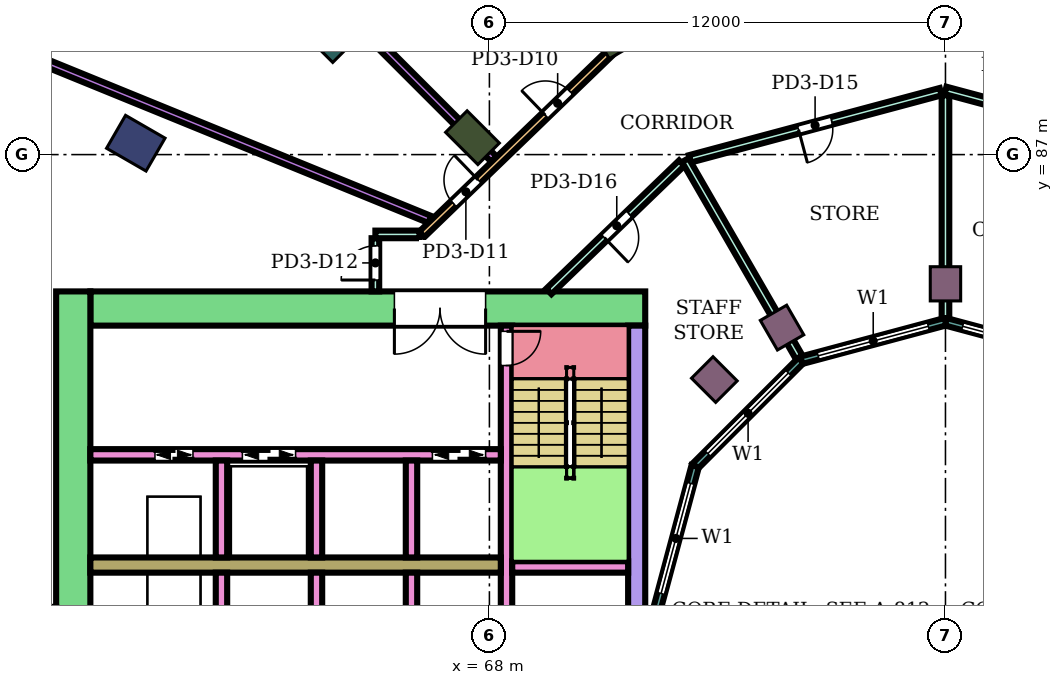
"""IFC4 building model, lengths in metres.
Left out: names, types, materials, properties, quantities, classifications, styles, units other than length and angle.
Written with IfcOpenShell. Run it as: python <this file> out.ifc"""

import sys

from ifc_helpers import new_model, si_unit, direction, frame, frame_2d, origin, origin_2d, place, context, subcontext, project, spatial, rectangle, extrude, element, fill, save


model = new_model("IFC4")
c1 = context("Model", 3, precision=1e-05, world=origin(), true_north=direction((0.0, 1.0)))
c2 = subcontext(c1, "Body", "Model", "MODEL_VIEW")
j1 = project(units=[si_unit("LENGTHUNIT", "METRE"), si_unit("PLANEANGLEUNIT", "RADIAN")], contexts=[c1])
p1 = place(None, origin())
s1 = spatial("IfcSite", under=j1, at=p1, CompositionType="ELEMENT")
p2 = place(p1, origin())
s2 = spatial("IfcBuilding", under=s1, at=p2, CompositionType="ELEMENT")
p3 = place(p2, frame((0.0, 0.0, 17.8)))
s3 = spatial("IfcBuildingStorey", under=s2, at=p3, CompositionType="ELEMENT", Elevation=17.8)
p4 = place(p3, frame((58.696, 87.3, 0.0), z_axis=(0.0, 0.0, 1.0), x_axis=(-0.866025403784, 0.5, 0.0)))
e1 = element("IfcColumn", 1, at=p4, inside=s3, PredefinedType="COLUMN", context=c2, shape_type="SweptSolid", body=[
    extrude(rectangle(XDim=1.2, YDim=1.0, at=origin_2d()), origin(), (0.0, 0.0, 1.0), 6.0),
])
for number, where, z_axis, x_axis in (
    (2, (71.2, 90.242, 0.0), (0.0, 0.0, 1.0), (-0.5, 0.866, 0.0)),
    (3, (67.555, 87.445, 0.0), (0.0, 0.0, 1.0), (-0.707, 0.707, 0.0)),
):
    element("IfcColumn", number, at=place(p3, frame(where, z_axis=z_axis, x_axis=x_axis)), inside=s3, PredefinedType="COLUMN", context=c2, shape_type="SweptSolid", body=[
        extrude(rectangle(XDim=1.2, YDim=0.8, at=origin_2d()), origin(), (0.0, 0.0, 1.0), 6.0),
    ])
for number, where, z_axis, x_axis in (
    (4, (80.0, 83.6, 0.0), (0.0, 0.0, 1.0), (0.0, 1.0, 0.0)),
    (5, (75.7, 82.448, 0.0), (0.0, 0.0, 1.0), (-0.5, 0.866, 0.0)),
    (6, (73.919, 81.081, 0.0), (0.0, 0.0, 1.0), (-0.707, 0.707, 0.0)),
):
    element("IfcColumn", number, at=place(p3, frame(where, z_axis=z_axis, x_axis=x_axis)), inside=s3, PredefinedType="COLUMN", context=c2, shape_type="SweptSolid", body=[
        extrude(rectangle(XDim=0.9, YDim=0.8, at=origin_2d()), origin(), (0.0, 0.0, 1.0), 6.0),
    ])
p5 = place(p3, frame((64.09, 90.91, 0.0), z_axis=(0.0, 0.0, 1.0), x_axis=(-0.707106781187, 0.707106781187, 0.0)))
e7 = element("IfcColumn", 7, at=p5, inside=s3, PredefinedType="COLUMN", context=c2, shape_type="SweptSolid", body=[
    extrude(rectangle(XDim=1.8, YDim=2.4, at=origin_2d()), origin(), (0.0, 0.0, 1.0), 6.0),
])
p6 = place(p3, frame((72.1, 82.95, 0.0), z_axis=(0.0, 0.0, 1.0), x_axis=(-1.0, 0.0, 0.0)))
e8 = element("IfcWall", 8, at=p6, inside=s3, PredefinedType="SHEAR", context=c2, shape_type="SweptSolid", body=[
    extrude(rectangle(XDim=14.6, YDim=0.9, at=frame_2d((7.3, 0.0))), origin(), (0.0, 0.0, 1.0), 5.55),
])
p7 = place(p6, frame((4.2, 0.0, 0.0)))
e9 = element("IfcOpeningElement", 9, at=p7, cuts=e8, PredefinedType="OPENING", context=c2, shape_type="SweptSolid", body=[
    extrude(rectangle(XDim=2.4, YDim=2.4, at=frame_2d((1.2, 1.2))), frame((0.0, 0.46, 0.0), z_axis=(0.0, -1.0, 0.0), x_axis=(1.0, 0.0, 0.0)), (0.0, 0.0, 1.0), 0.92),
])
p8 = place(p3, frame((71.875, 82.5, 0.0), z_axis=(0.0, 0.0, 1.0), x_axis=(0.0, -1.0, 0.0)))
e10 = element("IfcWall", 10, at=p8, inside=s3, PredefinedType="SHEAR", context=c2, shape_type="SweptSolid", body=[
    extrude(rectangle(XDim=7.5, YDim=0.45, at=frame_2d((3.75, 0.0))), origin(), (0.0, 0.0, 1.0), 5.55),
])
p9 = place(p3, frame((57.05, 83.4, 0.0), z_axis=(0.0, 0.0, 1.0), x_axis=(0.0, -1.0, 0.0)))
e11 = element("IfcWall", 11, at=p9, inside=s3, PredefinedType="SHEAR", context=c2, shape_type="SweptSolid", body=[
    extrude(rectangle(XDim=16.8, YDim=0.9, at=frame_2d((8.4, 0.0))), origin(), (0.0, 0.0, 1.0), 5.55),
])
p10 = place(p3, frame((68.45, 82.5, 0.0), z_axis=(0.0, 0.0, 1.0), x_axis=(0.0, -1.0, 0.0)))
e12 = element("IfcWall", 12, at=p10, inside=s3, PredefinedType="SHEAR", context=c2, shape_type="SweptSolid", body=[
    extrude(rectangle(XDim=7.5, YDim=0.3, at=frame_2d((3.75, 0.0))), origin(), (0.0, 0.0, 1.0), 5.55),
])
p11 = place(p10, frame((0.15, 0.0, 0.0)))
e13 = element("IfcOpeningElement", 13, at=p11, cuts=e12, PredefinedType="OPENING", context=c2, shape_type="SweptSolid", body=[
    extrude(rectangle(XDim=0.9, YDim=2.1, at=frame_2d((0.45, 1.05))), frame((0.0, 0.16, 0.0), z_axis=(0.0, -1.0, 0.0), x_axis=(1.0, 0.0, 0.0)), (0.0, 0.0, 1.0), 0.32),
])
p12 = place(p3, frame((71.65, 76.15, 0.0), z_axis=(0.0, 0.0, 1.0), x_axis=(-1.0, 0.0, 0.0)))
e14 = element("IfcWall", 14, at=p12, inside=s3, PredefinedType="SHEAR", context=c2, shape_type="SweptSolid", body=[
    extrude(rectangle(XDim=3.05, YDim=0.3, at=frame_2d((1.525, 0.0))), origin(), (0.0, 0.0, 1.0), 5.55),
])
p13 = place(p3, frame((68.3, 76.2, 0.0), z_axis=(0.0, 0.0, 1.0), x_axis=(-1.0, 0.0, 0.0)))
e15 = element("IfcWall", 15, at=p13, inside=s3, PredefinedType="SHEAR", context=c2, shape_type="SweptSolid", body=[
    extrude(rectangle(XDim=10.8, YDim=0.4, at=frame_2d((5.4, 0.0))), origin(), (0.0, 0.0, 1.0), 5.55),
])
p14 = place(p3, frame((68.3, 79.1, 0.0), z_axis=(0.0, 0.0, 1.0), x_axis=(-1.0, 0.0, 0.0)))
e16 = element("IfcWall", 16, at=p14, inside=s3, PredefinedType="SHEAR", context=c2, shape_type="SweptSolid", body=[
    extrude(rectangle(XDim=10.8, YDim=0.3, at=frame_2d((5.4, 0.0))), origin(), (0.0, 0.0, 1.0), 5.55),
])
p15 = place(p14, frame((0.4, 0.0, 0.0)))
e17 = element("IfcOpeningElement", 17, at=p15, cuts=e16, PredefinedType="OPENING", context=c2, shape_type="SweptSolid", body=[
    extrude(rectangle(XDim=1.4, YDim=2.1, at=frame_2d((0.7, 1.05))), frame((0.0, 0.16, 0.0), z_axis=(0.0, -1.0, 0.0), x_axis=(1.0, 0.0, 0.0)), (0.0, 0.0, 1.0), 0.32),
])
p16 = place(p14, frame((5.4, 0.0, 0.0)))
e18 = element("IfcOpeningElement", 18, at=p16, cuts=e16, PredefinedType="OPENING", context=c2, shape_type="SweptSolid", body=[
    extrude(rectangle(XDim=1.4, YDim=2.1, at=frame_2d((0.7, 1.05))), frame((0.0, 0.16, 0.0), z_axis=(0.0, -1.0, 0.0), x_axis=(1.0, 0.0, 0.0)), (0.0, 0.0, 1.0), 0.32),
])
p17 = place(p14, frame((8.1, 0.0, 0.0)))
e19 = element("IfcOpeningElement", 19, at=p17, cuts=e16, PredefinedType="OPENING", context=c2, shape_type="SweptSolid", body=[
    extrude(rectangle(XDim=1.0, YDim=2.1, at=frame_2d((0.5, 1.05))), frame((0.0, 0.16, 0.0), z_axis=(0.0, -1.0, 0.0), x_axis=(1.0, 0.0, 0.0)), (0.0, 0.0, 1.0), 0.32),
])
for number, where, z_axis, x_axis in (
    (20, (65.95, 76.0, 0.0), (0.0, 0.0, 1.0), (0.0, -1.0, 0.0)),
    (21, (63.45, 76.0, 0.0), (0.0, 0.0, 1.0), (0.0, -1.0, 0.0)),
    (22, (60.95, 76.0, 0.0), (0.0, 0.0, 1.0), (0.0, -1.0, 0.0)),
    (23, (65.95, 78.95, 0.0), (0.0, 0.0, 1.0), (0.0, -1.0, 0.0)),
    (24, (63.45, 78.95, 0.0), (0.0, 0.0, 1.0), (0.0, -1.0, 0.0)),
    (25, (60.95, 78.95, 0.0), (0.0, 0.0, 1.0), (0.0, -1.0, 0.0)),
):
    element("IfcWall", number, at=place(p3, frame(where, z_axis=z_axis, x_axis=x_axis)), inside=s3, PredefinedType="SHEAR", context=c2, shape_type="SweptSolid", body=[
        extrude(rectangle(XDim=2.55, YDim=0.3, at=frame_2d((1.275, 0.0))), origin(), (0.0, 0.0, 1.0), 5.55),
    ])
p18 = place(p3, frame((83.802, 81.585, 0.0), z_axis=(0.0, 0.0, 1.0), x_axis=(-0.965933654434, 0.258789828301, 0.0)))
e26 = element("IfcWall", 26, at=p18, inside=s3, PredefinedType="NOTDEFINED", context=c2, shape_type="SweptSolid", body=[
    extrude(rectangle(XDim=3.936, YDim=0.2, at=frame_2d((1.968, 0.0))), origin(), (0.0, 0.0, 1.0), 6.0),
])
p19 = place(p18, frame((0.468, 0.0, 0.9)))
e27 = element("IfcOpeningElement", 27, at=p19, cuts=e26, PredefinedType="OPENING", context=c2, shape_type="SweptSolid", body=[
    extrude(rectangle(XDim=3.0, YDim=2.3, at=frame_2d((1.5, 1.15))), frame((0.0, 0.11, 0.0), z_axis=(0.0, -1.0, 0.0), x_axis=(1.0, 0.0, 0.0)), (0.0, 0.0, 1.0), 0.22),
])
p20 = place(p3, frame((80.0, 82.604, 0.0), z_axis=(0.0, 0.0, 1.0), x_axis=(-0.965933654434, -0.258789828301, 0.0)))
e28 = element("IfcWall", 28, at=p20, inside=s3, PredefinedType="NOTDEFINED", context=c2, shape_type="SweptSolid", body=[
    extrude(rectangle(XDim=3.936, YDim=0.2, at=frame_2d((1.968, 0.0))), origin(), (0.0, 0.0, 1.0), 6.0),
])
p21 = place(p20, frame((0.468, 0.0, 0.9)))
e29 = element("IfcOpeningElement", 29, at=p21, cuts=e28, PredefinedType="OPENING", context=c2, shape_type="SweptSolid", body=[
    extrude(rectangle(XDim=3.0, YDim=2.3, at=frame_2d((1.5, 1.15))), frame((0.0, 0.11, 0.0), z_axis=(0.0, -1.0, 0.0), x_axis=(1.0, 0.0, 0.0)), (0.0, 0.0, 1.0), 0.22),
])
p22 = place(p3, frame((76.198, 81.585, 0.0), z_axis=(0.0, 0.0, 1.0), x_axis=(-0.707106781187, -0.707106781187, 0.0)))
e30 = element("IfcWall", 30, at=p22, inside=s3, PredefinedType="NOTDEFINED", context=c2, shape_type="SweptSolid", body=[
    extrude(rectangle(XDim=3.936, YDim=0.2, at=frame_2d((1.968, 0.0))), origin(), (0.0, 0.0, 1.0), 6.0),
])
p23 = place(p22, frame((0.468, 0.0, 0.9)))
e31 = element("IfcOpeningElement", 31, at=p23, cuts=e30, PredefinedType="OPENING", context=c2, shape_type="SweptSolid", body=[
    extrude(rectangle(XDim=3.0, YDim=2.3, at=frame_2d((1.5, 1.15))), frame((0.0, 0.11, 0.0), z_axis=(0.0, -1.0, 0.0), x_axis=(1.0, 0.0, 0.0)), (0.0, 0.0, 1.0), 0.22),
])
p24 = place(p3, frame((73.415, 78.802, 0.0), z_axis=(0.0, 0.0, 1.0), x_axis=(-0.258789828301, -0.965933654434, 0.0)))
e32 = element("IfcWall", 32, at=p24, inside=s3, PredefinedType="NOTDEFINED", context=c2, shape_type="SweptSolid", body=[
    extrude(rectangle(XDim=3.936, YDim=0.2, at=frame_2d((1.968, 0.0))), origin(), (0.0, 0.0, 1.0), 6.0),
])
p25 = place(p24, frame((0.468, 0.0, 0.9)))
e33 = element("IfcOpeningElement", 33, at=p25, cuts=e32, PredefinedType="OPENING", context=c2, shape_type="SweptSolid", body=[
    extrude(rectangle(XDim=3.0, YDim=2.3, at=frame_2d((1.5, 1.15))), frame((0.0, 0.11, 0.0), z_axis=(0.0, -1.0, 0.0), x_axis=(1.0, 0.0, 0.0)), (0.0, 0.0, 1.0), 0.22),
])
p26 = place(p3, frame((52.043, 91.164, 0.0), z_axis=(0.0, 0.0, 1.0), x_axis=(0.925899689018, -0.377769461281, 0.0)))
e34 = element("IfcWall", 34, at=p26, inside=s3, PredefinedType="PARTITIONING", context=c2, shape_type="SweptSolid", body=[
    extrude(rectangle(XDim=15.539, YDim=0.2, at=frame_2d((7.77, 0.0))), origin(), (0.0, 0.0, 1.0), 4.55),
])
p27 = place(p3, frame((57.162, 97.838, 0.0), z_axis=(0.0, 0.0, 1.0), x_axis=(0.707106781187, -0.707106781187, 0.0)))
e35 = element("IfcWall", 35, at=p27, inside=s3, PredefinedType="PARTITIONING", context=c2, shape_type="SweptSolid", body=[
    extrude(rectangle(XDim=15.493, YDim=0.2, at=frame_2d((7.747, 0.0))), origin(), (0.0, 0.0, 1.0), 4.55),
])
p28 = place(p3, frame((65.0, 83.401, 0.0), z_axis=(0.0, 0.0, 1.0), x_axis=(0.0, 1.0, 0.0)))
e36 = element("IfcWall", 36, at=p28, inside=s3, PredefinedType="PARTITIONING", context=c2, shape_type="SweptSolid", body=[
    extrude(rectangle(XDim=1.399, YDim=0.2, at=frame_2d((0.7, 0.0))), origin(), (0.0, 0.0, 1.0), 5.55),
])
p29 = place(p28, frame((0.299, 0.0, 0.0)))
e37 = element("IfcOpeningElement", 37, at=p29, cuts=e36, PredefinedType="OPENING", context=c2, shape_type="SweptSolid", body=[
    extrude(rectangle(XDim=0.9, YDim=2.1, at=frame_2d((0.45, 1.05))), frame((0.0, 0.11, 0.0), z_axis=(0.0, -1.0, 0.0), x_axis=(1.0, 0.0, 0.0)), (0.0, 0.0, 1.0), 0.22),
])
p30 = place(p3, frame((65.0, 84.9, 0.0), z_axis=(0.0, 0.0, 1.0), x_axis=(1.0, 0.0, 0.0)))
e38 = element("IfcWall", 38, at=p30, inside=s3, PredefinedType="PARTITIONING", context=c2, shape_type="SweptSolid", body=[
    extrude(rectangle(XDim=1.16, YDim=0.2, at=frame_2d((0.58, 0.0))), origin(), (0.0, 0.0, 1.0), 5.55),
])
p31 = place(p3, frame((66.22, 84.9, 0.0), z_axis=(0.0, 0.0, 1.0), x_axis=(0.719604938078, 0.694383707394, 0.0)))
e39 = element("IfcWall", 39, at=p31, inside=s3, PredefinedType="PARTITIONING", context=c2, shape_type="SweptSolid", body=[
    extrude(rectangle(XDim=7.173, YDim=0.2, at=frame_2d((3.586, 0.0))), origin(), (0.0, 0.0, 1.0), 5.05),
])
p32 = place(p31, frame((4.519, 0.0, 0.0)))
e40 = element("IfcOpeningElement", 40, at=p32, cuts=e39, PredefinedType="OPENING", context=c2, shape_type="SweptSolid", body=[
    extrude(rectangle(XDim=0.9, YDim=2.1, at=frame_2d((0.45, 1.05))), frame((0.0, 0.11, 0.0), z_axis=(0.0, -1.0, 0.0), x_axis=(1.0, 0.0, 0.0)), (0.0, 0.0, 1.0), 0.22),
])
p33 = place(p31, frame((1.163, 0.0, 0.0)))
e41 = element("IfcOpeningElement", 41, at=p33, cuts=e39, PredefinedType="OPENING", context=c2, shape_type="SweptSolid", body=[
    extrude(rectangle(XDim=0.9, YDim=2.1, at=frame_2d((0.45, 1.05))), frame((0.0, 0.11, 0.0), z_axis=(0.0, -1.0, 0.0), x_axis=(1.0, 0.0, 0.0)), (0.0, 0.0, 1.0), 0.22),
])
p34 = place(p3, frame((69.563, 83.4, 0.0), z_axis=(0.0, 0.0, 1.0), x_axis=(0.719454254864, 0.694539829785, 0.0)))
e42 = element("IfcWall", 42, at=p34, inside=s3, PredefinedType="PARTITIONING", context=c2, shape_type="SweptSolid", body=[
    extrude(rectangle(XDim=4.86, YDim=0.2, at=frame_2d((2.43, 0.0))), origin(), (0.0, 0.0, 1.0), 5.55),
])
p35 = place(p34, frame((2.035, 0.0, 0.0)))
e43 = element("IfcOpeningElement", 43, at=p35, cuts=e42, PredefinedType="OPENING", context=c2, shape_type="SweptSolid", body=[
    extrude(rectangle(XDim=0.9, YDim=2.1, at=frame_2d((0.45, 1.05))), frame((0.0, 0.11, 0.0), z_axis=(0.0, -1.0, 0.0), x_axis=(1.0, 0.0, 0.0)), (0.0, 0.0, 1.0), 0.22),
])
p36 = place(p3, frame((73.274, 86.888, 0.0), z_axis=(0.0, 0.0, 1.0), x_axis=(0.965941353683, 0.258761089124, 0.0)))
e44 = element("IfcWall", 44, at=p36, inside=s3, PredefinedType="PARTITIONING", context=c2, shape_type="SweptSolid", body=[
    extrude(rectangle(XDim=6.833, YDim=0.2, at=frame_2d((3.417, 0.0))), origin(), (0.0, 0.0, 1.0), 5.55),
])
p37 = place(p36, frame((2.961, 0.0, 0.0)))
e45 = element("IfcOpeningElement", 45, at=p37, cuts=e44, PredefinedType="OPENING", context=c2, shape_type="SweptSolid", body=[
    extrude(rectangle(XDim=0.9, YDim=2.1, at=frame_2d((0.45, 1.05))), frame((0.0, 0.11, 0.0), z_axis=(0.0, -1.0, 0.0), x_axis=(1.0, 0.0, 0.0)), (0.0, 0.0, 1.0), 0.22),
])
p38 = place(p3, frame((73.155, 86.856, 0.0), z_axis=(0.0, 0.0, 1.0), x_axis=(0.499982276674, -0.86603563611, 0.0)))
e46 = element("IfcWall", 46, at=p38, inside=s3, PredefinedType="PARTITIONING", context=c2, shape_type="SweptSolid", body=[
    extrude(rectangle(XDim=5.992, YDim=0.2, at=frame_2d((2.996, 0.0))), origin(), (0.0, 0.0, 1.0), 5.55),
])
p39 = place(p3, frame((80.0, 82.699, 0.0), z_axis=(0.0, 0.0, 1.0), x_axis=(0.0, 1.0, 0.0)))
e47 = element("IfcWall", 47, at=p39, inside=s3, PredefinedType="PARTITIONING", context=c2, shape_type="SweptSolid", body=[
    extrude(rectangle(XDim=5.861, YDim=0.2, at=frame_2d((2.931, 0.0))), origin(), (0.0, 0.0, 1.0), 5.55),
])
p40 = place(p3, frame((80.0, 88.69, 0.0), z_axis=(0.0, 0.0, 1.0), x_axis=(0.965929896633, -0.258803853893, 0.0)))
e48 = element("IfcWall", 48, at=p40, inside=s3, PredefinedType="PARTITIONING", context=c2, shape_type="SweptSolid", body=[
    extrude(rectangle(XDim=6.963, YDim=0.2, at=frame_2d((3.481, 0.0))), origin(), (0.0, 0.0, 1.0), 5.55),
])
p41 = place(p40, frame((3.102, 0.0, 0.0)))
e49 = element("IfcOpeningElement", 49, at=p41, cuts=e48, PredefinedType="OPENING", context=c2, shape_type="SweptSolid", body=[
    extrude(rectangle(XDim=0.9, YDim=2.1, at=frame_2d((0.45, 1.05))), frame((0.0, 0.11, 0.0), z_axis=(0.0, -1.0, 0.0), x_axis=(1.0, 0.0, 0.0)), (0.0, 0.0, 1.0), 0.22),
])
p42 = place(p19, origin())
e50 = element("IfcWindow", 50, at=p42, inside=s3, PartitioningType="SINGLE_PANEL", PredefinedType="WINDOW", context=c2, shape_type="SweptSolid", body=[
    extrude(rectangle(XDim=3.0, YDim=2.3, at=frame_2d((1.5, 1.15))), frame((0.0, 0.03, 0.0), z_axis=(0.0, -1.0, 0.0), x_axis=(1.0, 0.0, 0.0)), (0.0, 0.0, 1.0), 0.06),
])
fill(e27, e50)
p43 = place(p21, origin())
e51 = element("IfcWindow", 51, at=p43, inside=s3, PartitioningType="SINGLE_PANEL", PredefinedType="WINDOW", context=c2, shape_type="SweptSolid", body=[
    extrude(rectangle(XDim=3.0, YDim=2.3, at=frame_2d((1.5, 1.15))), frame((0.0, 0.03, 0.0), z_axis=(0.0, -1.0, 0.0), x_axis=(1.0, 0.0, 0.0)), (0.0, 0.0, 1.0), 0.06),
])
fill(e29, e51)
p44 = place(p23, origin())
e52 = element("IfcWindow", 52, at=p44, inside=s3, PartitioningType="SINGLE_PANEL", PredefinedType="WINDOW", context=c2, shape_type="SweptSolid", body=[
    extrude(rectangle(XDim=3.0, YDim=2.3, at=frame_2d((1.5, 1.15))), frame((0.0, 0.03, 0.0), z_axis=(0.0, -1.0, 0.0), x_axis=(1.0, 0.0, 0.0)), (0.0, 0.0, 1.0), 0.06),
])
fill(e31, e52)
p45 = place(p25, origin())
e53 = element("IfcWindow", 53, at=p45, inside=s3, PartitioningType="SINGLE_PANEL", PredefinedType="WINDOW", context=c2, shape_type="SweptSolid", body=[
    extrude(rectangle(XDim=3.0, YDim=2.3, at=frame_2d((1.5, 1.15))), frame((0.0, 0.03, 0.0), z_axis=(0.0, -1.0, 0.0), x_axis=(1.0, 0.0, 0.0)), (0.0, 0.0, 1.0), 0.06),
])
fill(e33, e53)
p46 = place(p32, origin())
e54 = element("IfcDoor", 54, at=p46, inside=s3, OperationType="SINGLE_SWING_LEFT", PredefinedType="DOOR", context=c2, shape_type="SweptSolid", body=[
    extrude(rectangle(XDim=0.9, YDim=2.1, at=frame_2d((0.45, 1.05))), frame((0.0, 0.025, 0.0), z_axis=(0.0, -1.0, 0.0), x_axis=(1.0, 0.0, 0.0)), (0.0, 0.0, 1.0), 0.05),
])
fill(e40, e54)
p47 = place(p33, origin())
e55 = element("IfcDoor", 55, at=p47, inside=s3, OperationType="SINGLE_SWING_RIGHT", PredefinedType="DOOR", context=c2, shape_type="SweptSolid", body=[
    extrude(rectangle(XDim=0.9, YDim=2.1, at=frame_2d((0.45, 1.05))), frame((0.0, 0.025, 0.0), z_axis=(0.0, -1.0, 0.0), x_axis=(1.0, 0.0, 0.0)), (0.0, 0.0, 1.0), 0.05),
])
fill(e41, e55)
p48 = place(p29, origin())
e56 = element("IfcDoor", 56, at=p48, inside=s3, OperationType="SINGLE_SWING_LEFT", PredefinedType="DOOR", context=c2, shape_type="SweptSolid", body=[
    extrude(rectangle(XDim=0.9, YDim=2.1, at=frame_2d((0.45, 1.05))), frame((0.0, 0.025, 0.0), z_axis=(0.0, -1.0, 0.0), x_axis=(1.0, 0.0, 0.0)), (0.0, 0.0, 1.0), 0.05),
])
fill(e37, e56)
p49 = place(p37, frame((0.9, 0.0, 0.0), z_axis=(0.0, 0.0, 1.0), x_axis=(-1.0, 0.0, 0.0)))
e57 = element("IfcDoor", 57, at=p49, inside=s3, OperationType="SINGLE_SWING_RIGHT", PredefinedType="DOOR", context=c2, shape_type="SweptSolid", body=[
    extrude(rectangle(XDim=0.9, YDim=2.1, at=frame_2d((0.45, 1.05))), frame((0.0, 0.025, 0.0), z_axis=(0.0, -1.0, 0.0), x_axis=(1.0, 0.0, 0.0)), (0.0, 0.0, 1.0), 0.05),
])
fill(e45, e57)
p50 = place(p35, frame((0.9, 0.0, 0.0), z_axis=(0.0, 0.0, 1.0), x_axis=(-1.0, 0.0, 0.0)))
e58 = element("IfcDoor", 58, at=p50, inside=s3, OperationType="SINGLE_SWING_RIGHT", PredefinedType="DOOR", context=c2, shape_type="SweptSolid", body=[
    extrude(rectangle(XDim=0.9, YDim=2.1, at=frame_2d((0.45, 1.05))), frame((0.0, 0.025, 0.0), z_axis=(0.0, -1.0, 0.0), x_axis=(1.0, 0.0, 0.0)), (0.0, 0.0, 1.0), 0.05),
])
fill(e43, e58)
p51 = place(p11, origin())
e59 = element("IfcDoor", 59, at=p51, inside=s3, OperationType="SINGLE_SWING_LEFT", PredefinedType="DOOR", context=c2, shape_type="SweptSolid", body=[
    extrude(rectangle(XDim=0.9, YDim=2.1, at=frame_2d((0.45, 1.05))), frame((0.0, 0.025, 0.0), z_axis=(0.0, -1.0, 0.0), x_axis=(1.0, 0.0, 0.0)), (0.0, 0.0, 1.0), 0.05),
])
fill(e13, e59)
p52 = place(p15, origin())
e60 = element("IfcDoor", 60, at=p52, inside=s3, OperationType="DOUBLE_DOOR_SLIDING", PredefinedType="DOOR", context=c2, shape_type="SweptSolid", body=[
    extrude(rectangle(XDim=1.4, YDim=2.1, at=frame_2d((0.7, 1.05))), frame((0.0, 0.025, 0.0), z_axis=(0.0, -1.0, 0.0), x_axis=(1.0, 0.0, 0.0)), (0.0, 0.0, 1.0), 0.05),
])
fill(e17, e60)
p53 = place(p16, origin())
e61 = element("IfcDoor", 61, at=p53, inside=s3, OperationType="DOUBLE_DOOR_SLIDING", PredefinedType="DOOR", context=c2, shape_type="SweptSolid", body=[
    extrude(rectangle(XDim=1.4, YDim=2.1, at=frame_2d((0.7, 1.05))), frame((0.0, 0.025, 0.0), z_axis=(0.0, -1.0, 0.0), x_axis=(1.0, 0.0, 0.0)), (0.0, 0.0, 1.0), 0.05),
])
fill(e18, e61)
p54 = place(p17, origin())
e62 = element("IfcDoor", 62, at=p54, inside=s3, OperationType="DOUBLE_DOOR_SLIDING", PredefinedType="DOOR", context=c2, shape_type="SweptSolid", body=[
    extrude(rectangle(XDim=1.0, YDim=2.1, at=frame_2d((0.5, 1.05))), frame((0.0, 0.025, 0.0), z_axis=(0.0, -1.0, 0.0), x_axis=(1.0, 0.0, 0.0)), (0.0, 0.0, 1.0), 0.05),
])
fill(e19, e62)
p55 = place(p7, origin())
e63 = element("IfcDoor", 63, at=p55, inside=s3, OperationType="DOUBLE_DOOR_SINGLE_SWING", PredefinedType="DOOR", context=c2, shape_type="SweptSolid", body=[
    extrude(rectangle(XDim=2.4, YDim=2.4, at=frame_2d((1.2, 1.2))), frame((0.0, 0.025, 0.0), z_axis=(0.0, -1.0, 0.0), x_axis=(1.0, 0.0, 0.0)), (0.0, 0.0, 1.0), 0.05),
])
fill(e9, e63)
save(model, sys.argv[1])
